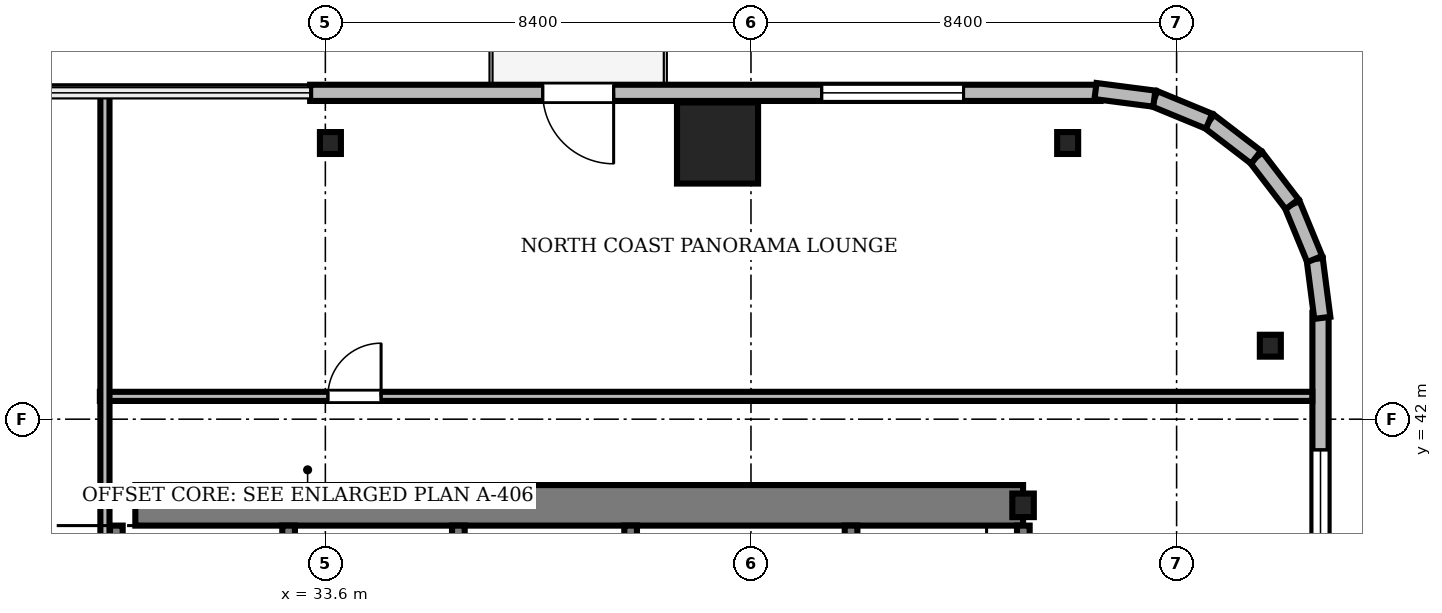
"""IFC4 building model, lengths in metres.
Left out: names, types, materials, properties, quantities, classifications, styles, units other than length and angle.
Written with IfcOpenShell. Run it as: python <this file> out.ifc"""

import sys

from ifc_helpers import new_model, si_unit, direction, frame, frame_2d, origin, origin_2d, place, context, subcontext, project, spatial, rectangle, i_section, extrude, source, transform, mapped, element, fill, save


model = new_model("IFC4")
c1 = context("Model", 3, precision=1e-05, world=origin(), true_north=direction((0.0, 1.0)))
c2 = subcontext(c1, "Body", "Model", "MODEL_VIEW")
j1 = project(units=[si_unit("LENGTHUNIT", "METRE"), si_unit("PLANEANGLEUNIT", "RADIAN")], contexts=[c1])
p1 = place(None, origin())
s1 = spatial("IfcSite", under=j1, at=p1, CompositionType="ELEMENT")
p2 = place(p1, origin())
s2 = spatial("IfcBuilding", under=s1, at=p2, CompositionType="ELEMENT")
p3 = place(p2, frame((0.0, 0.0, 155.7)))
s3 = spatial("IfcBuildingStorey", under=s2, at=p3, CompositionType="ELEMENT", Elevation=155.7)
m1 = source(origin(), c2, "Body", "SweptSolid", [
    extrude(rectangle(XDim=17.52, YDim=0.8, at=frame_2d((8.76, 0.0))), origin(), (0.0, 0.0, 1.0), 3.46),
])
p4 = place(p3, frame((29.85, 40.3, 0.0), z_axis=(0.0, 0.0, 1.0), x_axis=(1.0, 0.0, 0.0)))
e1 = element("IfcWall", 1, at=p4, inside=s3, PredefinedType="SHEAR", context=c2, shape_type="MappedRepresentation", body=[
    mapped(m1, transform((0.0, 0.0, 0.0), scale=1.0)),
])
m2 = source(origin(), c2, "Body", "SweptSolid", [
    extrude(i_section(OverallWidth=0.424, OverallDepth=0.465, WebThickness=0.035, FlangeThickness=0.056, FilletRadius=0.015, at=origin_2d()), origin(), (0.0, 0.0, 1.0), 3.46),
])
p5 = place(p3, frame((47.37, 40.3, 0.0), z_axis=(0.0, 0.0, 1.0), x_axis=(1.0, 0.0, 0.0)))
e2 = element("IfcColumn", 2, at=p5, inside=s3, PredefinedType="COLUMN", context=c2, shape_type="MappedRepresentation", body=[
    mapped(m2, transform((0.0, 0.0, 0.0), scale=1.0)),
])
m3 = source(origin(), c2, "Body", "SweptSolid", [
    extrude(rectangle(XDim=1.6, YDim=1.6, at=origin_2d()), origin(), (0.0, 0.0, 1.0), 3.46),
])
p6 = place(p3, frame((41.34, 47.45, 0.0), z_axis=(0.0, 0.0, 1.0), x_axis=(1.0, 0.0, 0.0)))
e3 = element("IfcColumn", 3, at=p6, inside=s3, PredefinedType="COLUMN", context=c2, shape_type="MappedRepresentation", body=[
    mapped(m3, transform((0.0, 0.0, 0.0), scale=1.0)),
])
m4 = source(origin(), c2, "Body", "SweptSolid", [
    extrude(i_section(OverallWidth=0.414, OverallDepth=0.432, WebThickness=0.026, FlangeThickness=0.04, FilletRadius=0.015, at=origin_2d()), origin(), (0.0, 0.0, 1.0), 3.46),
])
for number, where, z_axis, x_axis in (
    (4, (52.25, 43.45, 0.0), (0.0, 0.0, 1.0), (1.0, 0.0, 0.0)),
    (5, (48.25, 47.45, 0.0), (0.0, 0.0, 1.0), (1.0, 0.0, 0.0)),
    (6, (33.7, 47.45, 0.0), (0.0, 0.0, 1.0), (1.0, 0.0, 0.0)),
):
    element("IfcColumn", number, at=place(p3, frame(where, z_axis=z_axis, x_axis=x_axis)), inside=s3, PredefinedType="COLUMN", context=c2, shape_type="MappedRepresentation", body=[
        mapped(m4, transform((0.0, 0.0, 0.0), scale=1.0)),
    ])
m5 = source(origin(), c2, "Body", "SweptSolid", [
    extrude(rectangle(XDim=15.6, YDim=0.32, at=frame_2d((7.8, 0.0))), origin(), (0.0, 0.0, 1.0), 3.46),
])
p7 = place(p3, frame((48.9, 48.44, 0.0), z_axis=(0.0, 0.0, 1.0), x_axis=(-1.0, 0.0, 0.0)))
e7 = element("IfcWall", 7, at=p7, inside=s3, PredefinedType="SOLIDWALL", context=c2, shape_type="MappedRepresentation", body=[
    mapped(m5, transform((0.0, 0.0, 0.0), scale=1.0)),
])
m6 = source(origin(), c2, "Body", "SweptSolid", [
    extrude(rectangle(XDim=1.4, YDim=2.3, at=frame_2d((0.7, 1.15))), frame((0.0, 0.17, 0.0), z_axis=(0.0, -1.0, 0.0), x_axis=(1.0, 0.0, 0.0)), (0.0, 0.0, 1.0), 0.34),
])
p8 = place(p7, frame((9.61, 0.0, 0.0)))
e8 = element("IfcOpeningElement", 8, at=p8, cuts=e7, PredefinedType="OPENING", context=c2, shape_type="MappedRepresentation", body=[
    mapped(m6, transform((0.0, 0.0, 0.0), scale=1.0)),
])
m7 = source(origin(), c2, "Body", "SweptSolid", [
    extrude(rectangle(XDim=2.8, YDim=2.4, at=frame_2d((1.4, 1.2))), frame((0.0, 0.17, 0.0), z_axis=(0.0, -1.0, 0.0), x_axis=(1.0, 0.0, 0.0)), (0.0, 0.0, 1.0), 0.34),
])
p9 = place(p7, frame((2.705, 0.0, 0.72)))
e9 = element("IfcOpeningElement", 9, at=p9, cuts=e7, PredefinedType="OPENING", context=c2, shape_type="MappedRepresentation", body=[
    mapped(m7, transform((0.0, 0.0, 0.0), scale=1.0)),
])
m8 = source(origin(), c2, "Body", "SweptSolid", [
    extrude(rectangle(XDim=15.6, YDim=0.32, at=frame_2d((7.8, 0.0))), origin(), (0.0, 0.0, 1.0), 3.46),
])
p10 = place(p3, frame((53.24, 28.5, 0.0), z_axis=(0.0, 0.0, 1.0), x_axis=(0.0, 1.0, 0.0)))
e10 = element("IfcWall", 10, at=p10, inside=s3, PredefinedType="SOLIDWALL", context=c2, shape_type="MappedRepresentation", body=[
    mapped(m8, transform((0.0, 0.0, 0.0), scale=1.0)),
])
p11 = place(p10, frame((10.095, 0.0, 0.72)))
e11 = element("IfcOpeningElement", 11, at=p11, cuts=e10, PredefinedType="OPENING", context=c2, shape_type="MappedRepresentation", body=[
    mapped(m7, transform((0.0, 0.0, 0.0), scale=1.0)),
])
m9 = source(origin(), c2, "Body", "SweptSolid", [
    extrude(rectangle(XDim=1.17, YDim=0.32, at=frame_2d((0.585, 0.0))), origin(), (0.0, 0.0, 1.0), 3.46),
])
p12 = place(p3, frame((53.276, 44.0, 0.0), z_axis=(0.0, 0.0, 1.0), x_axis=(-0.128295670475, 0.991735963317, 0.0)))
e12 = element("IfcWall", 12, at=p12, inside=s3, PredefinedType="SOLIDWALL", context=c2, shape_type="MappedRepresentation", body=[
    mapped(m9, transform((0.0, 0.0, 0.0), scale=1.0)),
])
m10 = source(origin(), c2, "Body", "SweptSolid", [
    extrude(rectangle(XDim=1.169, YDim=0.32, at=frame_2d((0.584, 0.0))), origin(), (0.0, 0.0, 1.0), 3.46),
])
p13 = place(p3, frame((53.125, 45.16, 0.0), z_axis=(0.0, 0.0, 1.0), x_axis=(-0.381054331552, 0.924552646638, 0.0)))
e13 = element("IfcWall", 13, at=p13, inside=s3, PredefinedType="SOLIDWALL", context=c2, shape_type="MappedRepresentation", body=[
    mapped(m10, transform((0.0, 0.0, 0.0), scale=1.0)),
])
m11 = source(origin(), c2, "Body", "SweptSolid", [
    extrude(rectangle(XDim=1.169, YDim=0.32, at=frame_2d((0.584, 0.0))), origin(), (0.0, 0.0, 1.0), 3.46),
])
p14 = place(p3, frame((52.68, 46.241, 0.0), z_axis=(0.0, 0.0, 1.0), x_axis=(-0.608387696831, 0.793639975269, 0.0)))
e14 = element("IfcWall", 14, at=p14, inside=s3, PredefinedType="SOLIDWALL", context=c2, shape_type="MappedRepresentation", body=[
    mapped(m11, transform((0.0, 0.0, 0.0), scale=1.0)),
])
m12 = source(origin(), c2, "Body", "SweptSolid", [
    extrude(rectangle(XDim=1.169, YDim=0.32, at=frame_2d((0.584, 0.0))), origin(), (0.0, 0.0, 1.0), 3.46),
])
p15 = place(p3, frame((51.969, 47.169, 0.0), z_axis=(0.0, 0.0, 1.0), x_axis=(-0.793663520347, 0.608356981114, 0.0)))
e15 = element("IfcWall", 15, at=p15, inside=s3, PredefinedType="SOLIDWALL", context=c2, shape_type="MappedRepresentation", body=[
    mapped(m12, transform((0.0, 0.0, 0.0), scale=1.0)),
])
p16 = place(p3, frame((51.041, 47.88, 0.0), z_axis=(0.0, 0.0, 1.0), x_axis=(-0.924552646638, 0.381054331552, 0.0)))
e16 = element("IfcWall", 16, at=p16, inside=s3, PredefinedType="SOLIDWALL", context=c2, shape_type="MappedRepresentation", body=[
    mapped(m10, transform((0.0, 0.0, 0.0), scale=1.0)),
])
p17 = place(p3, frame((49.96, 48.325, 0.0), z_axis=(0.0, 0.0, 1.0), x_axis=(-0.991735963317, 0.128295670475, 0.0)))
e17 = element("IfcWall", 17, at=p17, inside=s3, PredefinedType="SOLIDWALL", context=c2, shape_type="MappedRepresentation", body=[
    mapped(m9, transform((0.0, 0.0, 0.0), scale=1.0)),
])
m13 = source(origin(), c2, "Body", "SweptSolid", [
    extrude(rectangle(XDim=9.25, YDim=0.25, at=frame_2d((4.625, 0.0))), origin(), (0.0, 0.0, 1.0), 3.5),
])
for number, where, z_axis, x_axis in (
    (18, (29.475, 30.65, 0.0), (0.0, 0.0, 1.0), (0.0, 1.0, 0.0)),
    (19, (32.875, 30.65, 0.0), (0.0, 0.0, 1.0), (0.0, 1.0, 0.0)),
    (20, (36.225, 30.65, 0.0), (0.0, 0.0, 1.0), (0.0, 1.0, 0.0)),
    (21, (39.625, 30.65, 0.0), (0.0, 0.0, 1.0), (0.0, 1.0, 0.0)),
    (22, (43.975, 30.65, 0.0), (0.0, 0.0, 1.0), (0.0, 1.0, 0.0)),
    (23, (47.375, 30.65, 0.0), (0.0, 0.0, 1.0), (0.0, 1.0, 0.0)),
):
    element("IfcWall", number, at=place(p3, frame(where, z_axis=z_axis, x_axis=x_axis)), inside=s3, PredefinedType="SOLIDWALL", context=c2, shape_type="MappedRepresentation", body=[
        mapped(m13, transform((0.0, 0.0, 0.0), scale=1.0)),
    ])
m14 = source(origin(), c2, "Body", "SweptSolid", [
    extrude(rectangle(XDim=23.928, YDim=0.18, at=frame_2d((11.964, 0.0))), origin(), (0.0, 0.0, 1.0), 2.702),
])
p18 = place(p3, frame((29.15, 42.45, 0.0), z_axis=(0.0, 0.0, 1.0), x_axis=(1.0, 0.0, 0.0)))
e24 = element("IfcWall", 24, at=p18, inside=s3, PredefinedType="PARTITIONING", context=c2, shape_type="MappedRepresentation", body=[
    mapped(m14, transform((0.0, 0.0, 0.0), scale=1.0)),
])
m15 = source(origin(), c2, "Body", "SweptSolid", [
    extrude(rectangle(XDim=1.05, YDim=2.2, at=frame_2d((0.525, 1.1))), frame((0.0, 0.1, 0.0), z_axis=(0.0, -1.0, 0.0), x_axis=(1.0, 0.0, 0.0)), (0.0, 0.0, 1.0), 0.2),
])
p19 = place(p18, frame((4.5, 0.0, 0.0)))
e25 = element("IfcOpeningElement", 25, at=p19, cuts=e24, PredefinedType="OPENING", context=c2, shape_type="MappedRepresentation", body=[
    mapped(m15, transform((0.0, 0.0, 0.0), scale=1.0)),
])
m16 = source(origin(), c2, "Body", "SweptSolid", [
    extrude(rectangle(XDim=11.45, YDim=0.18, at=frame_2d((5.725, 0.0))), origin(), (0.0, 0.0, 1.0), 2.702),
])
p20 = place(p3, frame((29.25, 37.02, 0.0), z_axis=(0.0, 0.0, 1.0), x_axis=(0.0, 1.0, 0.0)))
e26 = element("IfcWall", 26, at=p20, inside=s3, PredefinedType="PARTITIONING", context=c2, shape_type="MappedRepresentation", body=[
    mapped(m16, transform((0.0, 0.0, 0.0), scale=1.0)),
])
m17 = source(origin(), c2, "Body", "SweptSolid", [
    extrude(rectangle(XDim=1.4, YDim=2.3, at=frame_2d((0.7, 1.15))), frame((0.0, 0.025, 0.0), z_axis=(0.0, -1.0, 0.0), x_axis=(1.0, 0.0, 0.0)), (0.0, 0.0, 1.0), 0.05),
])
p21 = place(p8, frame((1.4, 0.0, 0.0), z_axis=(0.0, 0.0, 1.0), x_axis=(-1.0, 0.0, 0.0)))
e27 = element("IfcDoor", 27, at=p21, inside=s3, OperationType="DOUBLE_DOOR_SLIDING", PredefinedType="DOOR", context=c2, shape_type="MappedRepresentation", body=[
    mapped(m17, transform((0.0, 0.0, 0.0), scale=1.0)),
])
fill(e8, e27)
m18 = source(origin(), c2, "Body", "SweptSolid", [
    extrude(rectangle(XDim=2.8, YDim=2.4, at=frame_2d((1.4, 1.2))), frame((0.0, 0.03, 0.0), z_axis=(0.0, -1.0, 0.0), x_axis=(1.0, 0.0, 0.0)), (0.0, 0.0, 1.0), 0.06),
])
p22 = place(p9, origin())
e28 = element("IfcWindow", 28, at=p22, inside=s3, PartitioningType="SINGLE_PANEL", PredefinedType="WINDOW", context=c2, shape_type="MappedRepresentation", body=[
    mapped(m18, transform((0.0, 0.0, 0.0), scale=1.0)),
])
fill(e9, e28)
p23 = place(p11, origin())
e29 = element("IfcWindow", 29, at=p23, inside=s3, PartitioningType="SINGLE_PANEL", PredefinedType="WINDOW", context=c2, shape_type="MappedRepresentation", body=[
    mapped(m18, transform((0.0, 0.0, 0.0), scale=1.0)),
])
fill(e11, e29)
m19 = source(origin(), c2, "Body", "SweptSolid", [
    extrude(rectangle(XDim=1.05, YDim=2.2, at=frame_2d((0.525, 1.1))), frame((0.0, 0.025, 0.0), z_axis=(0.0, -1.0, 0.0), x_axis=(1.0, 0.0, 0.0)), (0.0, 0.0, 1.0), 0.05),
])
p24 = place(p19, origin())
e30 = element("IfcDoor", 30, at=p24, inside=s3, OperationType="SINGLE_SWING_RIGHT", PredefinedType="DOOR", context=c2, shape_type="MappedRepresentation", body=[
    mapped(m19, transform((0.0, 0.0, 0.0), scale=1.0)),
])
fill(e25, e30)
save(model, sys.argv[1])
